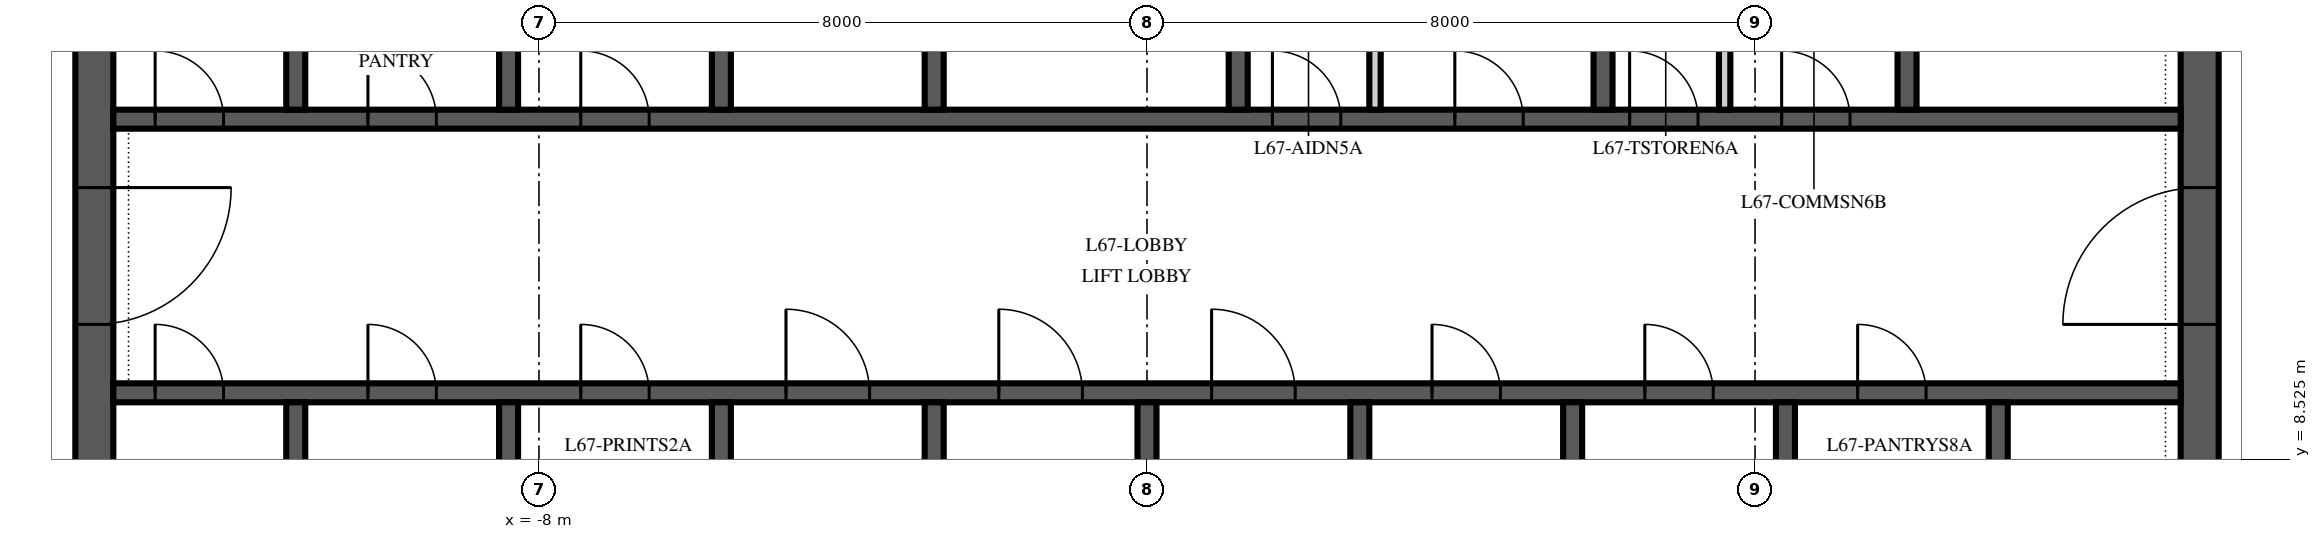
"""IFC4 building model, lengths in metres.
Left out: names, types, materials, properties, quantities, classifications, styles, units other than length and angle.
Written with IfcOpenShell. Run it as: python <this file> out.ifc"""

import sys

from ifc_helpers import new_model, si_unit, direction, frame, frame_2d, origin, place, context, subcontext, project, spatial, polyline, rectangle, outline, extrude, element, fill, save


model = new_model("IFC4")
c1 = context("Model", 3, precision=1e-05, world=origin(), true_north=direction((0.0, 1.0)))
c2 = subcontext(c1, "Body", "Model", "MODEL_VIEW")
j1 = project(units=[si_unit("LENGTHUNIT", "METRE"), si_unit("PLANEANGLEUNIT", "RADIAN")], contexts=[c1])
p1 = place(None, origin())
s1 = spatial("IfcSite", under=j1, at=p1, CompositionType="ELEMENT")
p2 = place(p1, origin())
s2 = spatial("IfcBuilding", under=s1, at=p2, CompositionType="ELEMENT")
p3 = place(p2, frame((0.0, 0.0, 288.0)))
s3 = spatial("IfcBuildingStorey", under=s2, at=p3, CompositionType="ELEMENT", Elevation=288.0)
p4 = place(p3, frame((13.85, 6.15, 0.0), z_axis=(0.0, 0.0, 1.0), x_axis=(0.0, 1.0, 0.0)))
e1 = element("IfcWall", 1, at=p4, inside=s3, PredefinedType="SHEAR", context=c2, shape_type="SweptSolid", body=[
    extrude(outline(polyline([(0.0, -0.25), (17.7, -0.25), (17.7, 0.0), (17.45, 0.0), (17.45, 0.25), (0.25, 0.25), (0.25, 0.0), (0.0, 0.0), (0.0, -0.25)])), origin(), (0.0, 0.0, 1.0), 4.0),
])
p5 = place(p4, frame((4.15, 0.0, 0.0)))
e2 = element("IfcOpeningElement", 2, at=p5, cuts=e1, PredefinedType="OPENING", context=c2, shape_type="SweptSolid", body=[
    extrude(rectangle(XDim=1.8, YDim=2.4, at=frame_2d((0.9, 1.2))), frame((0.0, 0.265, 0.0), z_axis=(0.0, -1.0, 0.0), x_axis=(1.0, 0.0, 0.0)), (0.0, 0.0, 1.0), 0.53),
])
p6 = place(p3, frame((-13.85, 23.85, 0.0), z_axis=(0.0, 0.0, 1.0), x_axis=(0.0, -1.0, 0.0)))
e3 = element("IfcWall", 3, at=p6, inside=s3, PredefinedType="SHEAR", context=c2, shape_type="SweptSolid", body=[
    extrude(outline(polyline([(0.0, -0.25), (17.7, -0.25), (17.7, 0.0), (17.45, 0.0), (17.45, 0.25), (0.25, 0.25), (0.25, 0.0), (0.0, 0.0), (0.0, -0.25)])), origin(), (0.0, 0.0, 1.0), 4.0),
])
p7 = place(p6, frame((11.75, 0.0, 0.0)))
e4 = element("IfcOpeningElement", 4, at=p7, cuts=e3, PredefinedType="OPENING", context=c2, shape_type="SweptSolid", body=[
    extrude(rectangle(XDim=1.8, YDim=2.4, at=frame_2d((0.9, 1.2))), frame((0.0, 0.265, 0.0), z_axis=(0.0, -1.0, 0.0), x_axis=(1.0, 0.0, 0.0)), (0.0, 0.0, 1.0), 0.53),
])
p8 = place(p3, frame((-13.6, 9.4, 0.0), z_axis=(0.0, 0.0, 1.0), x_axis=(1.0, 0.0, 0.0)))
e5 = element("IfcWall", 5, at=p8, inside=s3, PredefinedType="SHEAR", context=c2, shape_type="SweptSolid", body=[
    extrude(rectangle(XDim=27.2, YDim=0.25, at=frame_2d((13.6, 0.0))), origin(), (0.0, 0.0, 1.0), 4.0),
])
p9 = place(p8, frame((8.85, 0.0, 0.0)))
e6 = element("IfcOpeningElement", 6, at=p9, cuts=e5, PredefinedType="OPENING", context=c2, shape_type="SweptSolid", body=[
    extrude(rectangle(XDim=1.1, YDim=2.1, at=frame_2d((0.55, 1.05))), frame((0.0, 0.14, 0.0), z_axis=(0.0, -1.0, 0.0), x_axis=(1.0, 0.0, 0.0)), (0.0, 0.0, 1.0), 0.28),
])
p10 = place(p8, frame((11.65, 0.0, 0.0)))
e7 = element("IfcOpeningElement", 7, at=p10, cuts=e5, PredefinedType="OPENING", context=c2, shape_type="SweptSolid", body=[
    extrude(rectangle(XDim=1.1, YDim=2.1, at=frame_2d((0.55, 1.05))), frame((0.0, 0.14, 0.0), z_axis=(0.0, -1.0, 0.0), x_axis=(1.0, 0.0, 0.0)), (0.0, 0.0, 1.0), 0.28),
])
p11 = place(p8, frame((14.45, 0.0, 0.0)))
e8 = element("IfcOpeningElement", 8, at=p11, cuts=e5, PredefinedType="OPENING", context=c2, shape_type="SweptSolid", body=[
    extrude(rectangle(XDim=1.1, YDim=2.1, at=frame_2d((0.55, 1.05))), frame((0.0, 0.14, 0.0), z_axis=(0.0, -1.0, 0.0), x_axis=(1.0, 0.0, 0.0)), (0.0, 0.0, 1.0), 0.28),
])
p12 = place(p8, frame((0.55, 0.0, 0.0)))
e9 = element("IfcOpeningElement", 9, at=p12, cuts=e5, PredefinedType="OPENING", context=c2, shape_type="SweptSolid", body=[
    extrude(rectangle(XDim=0.9, YDim=2.1, at=frame_2d((0.45, 1.05))), frame((0.0, 0.14, 0.0), z_axis=(0.0, -1.0, 0.0), x_axis=(1.0, 0.0, 0.0)), (0.0, 0.0, 1.0), 0.28),
])
p13 = place(p8, frame((3.35, 0.0, 0.0)))
e10 = element("IfcOpeningElement", 10, at=p13, cuts=e5, PredefinedType="OPENING", context=c2, shape_type="SweptSolid", body=[
    extrude(rectangle(XDim=0.9, YDim=2.1, at=frame_2d((0.45, 1.05))), frame((0.0, 0.14, 0.0), z_axis=(0.0, -1.0, 0.0), x_axis=(1.0, 0.0, 0.0)), (0.0, 0.0, 1.0), 0.28),
])
p14 = place(p8, frame((6.15, 0.0, 0.0)))
e11 = element("IfcOpeningElement", 11, at=p14, cuts=e5, PredefinedType="OPENING", context=c2, shape_type="SweptSolid", body=[
    extrude(rectangle(XDim=0.9, YDim=2.1, at=frame_2d((0.45, 1.05))), frame((0.0, 0.14, 0.0), z_axis=(0.0, -1.0, 0.0), x_axis=(1.0, 0.0, 0.0)), (0.0, 0.0, 1.0), 0.28),
])
p15 = place(p8, frame((17.35, 0.0, 0.0)))
e12 = element("IfcOpeningElement", 12, at=p15, cuts=e5, PredefinedType="OPENING", context=c2, shape_type="SweptSolid", body=[
    extrude(rectangle(XDim=0.9, YDim=2.1, at=frame_2d((0.45, 1.05))), frame((0.0, 0.14, 0.0), z_axis=(0.0, -1.0, 0.0), x_axis=(1.0, 0.0, 0.0)), (0.0, 0.0, 1.0), 0.28),
])
p16 = place(p8, frame((20.15, 0.0, 0.0)))
e13 = element("IfcOpeningElement", 13, at=p16, cuts=e5, PredefinedType="OPENING", context=c2, shape_type="SweptSolid", body=[
    extrude(rectangle(XDim=0.9, YDim=2.1, at=frame_2d((0.45, 1.05))), frame((0.0, 0.14, 0.0), z_axis=(0.0, -1.0, 0.0), x_axis=(1.0, 0.0, 0.0)), (0.0, 0.0, 1.0), 0.28),
])
p17 = place(p8, frame((22.95, 0.0, 0.0)))
e14 = element("IfcOpeningElement", 14, at=p17, cuts=e5, PredefinedType="OPENING", context=c2, shape_type="SweptSolid", body=[
    extrude(rectangle(XDim=0.9, YDim=2.1, at=frame_2d((0.45, 1.05))), frame((0.0, 0.14, 0.0), z_axis=(0.0, -1.0, 0.0), x_axis=(1.0, 0.0, 0.0)), (0.0, 0.0, 1.0), 0.28),
])
p18 = place(p3, frame((-13.6, 13.0, 0.0), z_axis=(0.0, 0.0, 1.0), x_axis=(1.0, 0.0, 0.0)))
e15 = element("IfcWall", 15, at=p18, inside=s3, PredefinedType="SHEAR", context=c2, shape_type="SweptSolid", body=[
    extrude(rectangle(XDim=27.2, YDim=0.25, at=frame_2d((13.6, 0.0))), origin(), (0.0, 0.0, 1.0), 4.0),
])
p19 = place(p18, frame((15.25, 0.0, 0.0)))
e16 = element("IfcOpeningElement", 16, at=p19, cuts=e15, PredefinedType="OPENING", context=c2, shape_type="SweptSolid", body=[
    extrude(rectangle(XDim=0.9, YDim=2.1, at=frame_2d((0.45, 1.05))), frame((0.0, 0.14, 0.0), z_axis=(0.0, -1.0, 0.0), x_axis=(1.0, 0.0, 0.0)), (0.0, 0.0, 1.0), 0.28),
])
p20 = place(p18, frame((17.65, 0.0, 0.0)))
e17 = element("IfcOpeningElement", 17, at=p20, cuts=e15, PredefinedType="OPENING", context=c2, shape_type="SweptSolid", body=[
    extrude(rectangle(XDim=0.9, YDim=2.1, at=frame_2d((0.45, 1.05))), frame((0.0, 0.14, 0.0), z_axis=(0.0, -1.0, 0.0), x_axis=(1.0, 0.0, 0.0)), (0.0, 0.0, 1.0), 0.28),
])
p21 = place(p18, frame((19.95, 0.0, 0.0)))
e18 = element("IfcOpeningElement", 18, at=p21, cuts=e15, PredefinedType="OPENING", context=c2, shape_type="SweptSolid", body=[
    extrude(rectangle(XDim=0.9, YDim=2.1, at=frame_2d((0.45, 1.05))), frame((0.0, 0.14, 0.0), z_axis=(0.0, -1.0, 0.0), x_axis=(1.0, 0.0, 0.0)), (0.0, 0.0, 1.0), 0.28),
])
p22 = place(p18, frame((21.95, 0.0, 0.0)))
e19 = element("IfcOpeningElement", 19, at=p22, cuts=e15, PredefinedType="OPENING", context=c2, shape_type="SweptSolid", body=[
    extrude(rectangle(XDim=0.9, YDim=2.1, at=frame_2d((0.45, 1.05))), frame((0.0, 0.14, 0.0), z_axis=(0.0, -1.0, 0.0), x_axis=(1.0, 0.0, 0.0)), (0.0, 0.0, 1.0), 0.28),
])
p23 = place(p18, frame((0.55, 0.0, 0.0)))
e20 = element("IfcOpeningElement", 20, at=p23, cuts=e15, PredefinedType="OPENING", context=c2, shape_type="SweptSolid", body=[
    extrude(rectangle(XDim=0.9, YDim=2.1, at=frame_2d((0.45, 1.05))), frame((0.0, 0.14, 0.0), z_axis=(0.0, -1.0, 0.0), x_axis=(1.0, 0.0, 0.0)), (0.0, 0.0, 1.0), 0.28),
])
p24 = place(p18, frame((3.35, 0.0, 0.0)))
e21 = element("IfcOpeningElement", 21, at=p24, cuts=e15, PredefinedType="OPENING", context=c2, shape_type="SweptSolid", body=[
    extrude(rectangle(XDim=0.9, YDim=2.1, at=frame_2d((0.45, 1.05))), frame((0.0, 0.14, 0.0), z_axis=(0.0, -1.0, 0.0), x_axis=(1.0, 0.0, 0.0)), (0.0, 0.0, 1.0), 0.28),
])
p25 = place(p18, frame((6.15, 0.0, 0.0)))
e22 = element("IfcOpeningElement", 22, at=p25, cuts=e15, PredefinedType="OPENING", context=c2, shape_type="SweptSolid", body=[
    extrude(rectangle(XDim=0.9, YDim=2.1, at=frame_2d((0.45, 1.05))), frame((0.0, 0.14, 0.0), z_axis=(0.0, -1.0, 0.0), x_axis=(1.0, 0.0, 0.0)), (0.0, 0.0, 1.0), 0.28),
])
for number, where, z_axis, x_axis in (
    (23, (-11.2, 6.4, 0.0), (0.0, 0.0, 1.0), (0.0, 1.0, 0.0)),
    (24, (-8.4, 6.4, 0.0), (0.0, 0.0, 1.0), (0.0, 1.0, 0.0)),
    (25, (-5.6, 6.4, 0.0), (0.0, 0.0, 1.0), (0.0, 1.0, 0.0)),
    (26, (-2.8, 6.4, 0.0), (0.0, 0.0, 1.0), (0.0, 1.0, 0.0)),
    (27, (0.0, 6.4, 0.0), (0.0, 0.0, 1.0), (0.0, 1.0, 0.0)),
    (28, (2.8, 6.4, 0.0), (0.0, 0.0, 1.0), (0.0, 1.0, 0.0)),
    (29, (5.6, 6.4, 0.0), (0.0, 0.0, 1.0), (0.0, 1.0, 0.0)),
    (30, (8.4, 6.4, 0.0), (0.0, 0.0, 1.0), (0.0, 1.0, 0.0)),
    (31, (11.2, 6.4, 0.0), (0.0, 0.0, 1.0), (0.0, 1.0, 0.0)),
):
    element("IfcWall", number, at=place(p3, frame(where, z_axis=z_axis, x_axis=x_axis)), inside=s3, PredefinedType="SHEAR", context=c2, shape_type="SweptSolid", body=[
        extrude(rectangle(XDim=2.875, YDim=0.25, at=frame_2d((1.438, 0.0))), origin(), (0.0, 0.0, 1.0), 4.0),
    ])
for number, where, z_axis, x_axis in (
    (32, (-11.2, 13.125, 0.0), (0.0, 0.0, 1.0), (0.0, 1.0, 0.0)),
    (33, (-8.4, 13.125, 0.0), (0.0, 0.0, 1.0), (0.0, 1.0, 0.0)),
    (34, (-5.6, 13.125, 0.0), (0.0, 0.0, 1.0), (0.0, 1.0, 0.0)),
    (35, (-2.8, 13.125, 0.0), (0.0, 0.0, 1.0), (0.0, 1.0, 0.0)),
    (36, (1.2, 13.125, 0.0), (0.0, 0.0, 1.0), (0.0, 1.0, 0.0)),
    (37, (6.0, 13.125, 0.0), (0.0, 0.0, 1.0), (0.0, 1.0, 0.0)),
    (38, (10.0, 13.125, 0.0), (0.0, 0.0, 1.0), (0.0, 1.0, 0.0)),
):
    element("IfcWall", number, at=place(p3, frame(where, z_axis=z_axis, x_axis=x_axis)), inside=s3, PredefinedType="SHEAR", context=c2, shape_type="SweptSolid", body=[
        extrude(rectangle(XDim=2.75, YDim=0.25, at=frame_2d((1.375, 0.0))), origin(), (0.0, 0.0, 1.0), 4.0),
    ])
for number, where, z_axis, x_axis in (
    (39, (3.0, 13.125, 0.0), (0.0, 0.0, 1.0), (0.0, 1.0, 0.0)),
    (40, (7.6, 13.125, 0.0), (0.0, 0.0, 1.0), (0.0, 1.0, 0.0)),
):
    element("IfcWall", number, at=place(p3, frame(where, z_axis=z_axis, x_axis=x_axis)), inside=s3, PredefinedType="PARTITIONING", context=c2, shape_type="SweptSolid", body=[
        extrude(rectangle(XDim=2.75, YDim=0.15, at=frame_2d((1.375, 0.0))), origin(), (0.0, 0.0, 1.0), 3.85),
    ])
p26 = place(p5, origin())
e41 = element("IfcDoor", 41, at=p26, inside=s3, OperationType="DOUBLE_DOOR_SINGLE_SWING", PredefinedType="DOOR", context=c2, shape_type="SweptSolid", body=[
    extrude(rectangle(XDim=1.8, YDim=2.4, at=frame_2d((0.9, 1.2))), frame((0.0, 0.25, 0.0), z_axis=(0.0, -1.0, 0.0), x_axis=(1.0, 0.0, 0.0)), (0.0, 0.0, 1.0), 0.5),
])
fill(e2, e41)
p27 = place(p7, origin())
e42 = element("IfcDoor", 42, at=p27, inside=s3, OperationType="DOUBLE_DOOR_SINGLE_SWING", PredefinedType="DOOR", context=c2, shape_type="SweptSolid", body=[
    extrude(rectangle(XDim=1.8, YDim=2.4, at=frame_2d((0.9, 1.2))), frame((0.0, 0.25, 0.0), z_axis=(0.0, -1.0, 0.0), x_axis=(1.0, 0.0, 0.0)), (0.0, 0.0, 1.0), 0.5),
])
fill(e4, e42)
p28 = place(p9, origin())
e43 = element("IfcDoor", 43, at=p28, inside=s3, OperationType="SLIDING_TO_LEFT", PredefinedType="DOOR", context=c2, shape_type="SweptSolid", body=[
    extrude(rectangle(XDim=1.1, YDim=2.1, at=frame_2d((0.55, 1.05))), frame((0.0, 0.125, 0.0), z_axis=(0.0, -1.0, 0.0), x_axis=(1.0, 0.0, 0.0)), (0.0, 0.0, 1.0), 0.25),
])
fill(e6, e43)
p29 = place(p10, origin())
e44 = element("IfcDoor", 44, at=p29, inside=s3, OperationType="SLIDING_TO_LEFT", PredefinedType="DOOR", context=c2, shape_type="SweptSolid", body=[
    extrude(rectangle(XDim=1.1, YDim=2.1, at=frame_2d((0.55, 1.05))), frame((0.0, 0.125, 0.0), z_axis=(0.0, -1.0, 0.0), x_axis=(1.0, 0.0, 0.0)), (0.0, 0.0, 1.0), 0.25),
])
fill(e7, e44)
p30 = place(p11, origin())
e45 = element("IfcDoor", 45, at=p30, inside=s3, OperationType="SLIDING_TO_LEFT", PredefinedType="DOOR", context=c2, shape_type="SweptSolid", body=[
    extrude(rectangle(XDim=1.1, YDim=2.1, at=frame_2d((0.55, 1.05))), frame((0.0, 0.125, 0.0), z_axis=(0.0, -1.0, 0.0), x_axis=(1.0, 0.0, 0.0)), (0.0, 0.0, 1.0), 0.25),
])
fill(e8, e45)
p31 = place(p19, origin())
e46 = element("IfcDoor", 46, at=p31, inside=s3, OperationType="SINGLE_SWING_LEFT", PredefinedType="DOOR", context=c2, shape_type="SweptSolid", body=[
    extrude(rectangle(XDim=0.9, YDim=2.1, at=frame_2d((0.45, 1.05))), frame((0.0, 0.125, 0.0), z_axis=(0.0, -1.0, 0.0), x_axis=(1.0, 0.0, 0.0)), (0.0, 0.0, 1.0), 0.25),
])
fill(e16, e46)
p32 = place(p20, origin())
e47 = element("IfcDoor", 47, at=p32, inside=s3, OperationType="SINGLE_SWING_LEFT", PredefinedType="DOOR", context=c2, shape_type="SweptSolid", body=[
    extrude(rectangle(XDim=0.9, YDim=2.1, at=frame_2d((0.45, 1.05))), frame((0.0, 0.125, 0.0), z_axis=(0.0, -1.0, 0.0), x_axis=(1.0, 0.0, 0.0)), (0.0, 0.0, 1.0), 0.25),
])
fill(e17, e47)
p33 = place(p21, origin())
e48 = element("IfcDoor", 48, at=p33, inside=s3, OperationType="SINGLE_SWING_LEFT", PredefinedType="DOOR", context=c2, shape_type="SweptSolid", body=[
    extrude(rectangle(XDim=0.9, YDim=2.1, at=frame_2d((0.45, 1.05))), frame((0.0, 0.125, 0.0), z_axis=(0.0, -1.0, 0.0), x_axis=(1.0, 0.0, 0.0)), (0.0, 0.0, 1.0), 0.25),
])
fill(e18, e48)
p34 = place(p22, origin())
e49 = element("IfcDoor", 49, at=p34, inside=s3, OperationType="SINGLE_SWING_LEFT", PredefinedType="DOOR", context=c2, shape_type="SweptSolid", body=[
    extrude(rectangle(XDim=0.9, YDim=2.1, at=frame_2d((0.45, 1.05))), frame((0.0, 0.125, 0.0), z_axis=(0.0, -1.0, 0.0), x_axis=(1.0, 0.0, 0.0)), (0.0, 0.0, 1.0), 0.25),
])
fill(e19, e49)
p35 = place(p23, origin())
e50 = element("IfcDoor", 50, at=p35, inside=s3, OperationType="SINGLE_SWING_LEFT", PredefinedType="DOOR", context=c2, shape_type="SweptSolid", body=[
    extrude(rectangle(XDim=0.9, YDim=2.1, at=frame_2d((0.45, 1.05))), frame((0.0, 0.125, 0.0), z_axis=(0.0, -1.0, 0.0), x_axis=(1.0, 0.0, 0.0)), (0.0, 0.0, 1.0), 0.25),
])
fill(e20, e50)
p36 = place(p24, origin())
e51 = element("IfcDoor", 51, at=p36, inside=s3, OperationType="SINGLE_SWING_LEFT", PredefinedType="DOOR", context=c2, shape_type="SweptSolid", body=[
    extrude(rectangle(XDim=0.9, YDim=2.1, at=frame_2d((0.45, 1.05))), frame((0.0, 0.125, 0.0), z_axis=(0.0, -1.0, 0.0), x_axis=(1.0, 0.0, 0.0)), (0.0, 0.0, 1.0), 0.25),
])
fill(e21, e51)
p37 = place(p25, origin())
e52 = element("IfcDoor", 52, at=p37, inside=s3, OperationType="SINGLE_SWING_LEFT", PredefinedType="DOOR", context=c2, shape_type="SweptSolid", body=[
    extrude(rectangle(XDim=0.9, YDim=2.1, at=frame_2d((0.45, 1.05))), frame((0.0, 0.125, 0.0), z_axis=(0.0, -1.0, 0.0), x_axis=(1.0, 0.0, 0.0)), (0.0, 0.0, 1.0), 0.25),
])
fill(e22, e52)
p38 = place(p12, origin())
e53 = element("IfcDoor", 53, at=p38, inside=s3, OperationType="SINGLE_SWING_LEFT", PredefinedType="DOOR", context=c2, shape_type="SweptSolid", body=[
    extrude(rectangle(XDim=0.9, YDim=2.1, at=frame_2d((0.45, 1.05))), frame((0.0, 0.125, 0.0), z_axis=(0.0, -1.0, 0.0), x_axis=(1.0, 0.0, 0.0)), (0.0, 0.0, 1.0), 0.25),
])
fill(e9, e53)
p39 = place(p13, origin())
e54 = element("IfcDoor", 54, at=p39, inside=s3, OperationType="SINGLE_SWING_LEFT", PredefinedType="DOOR", context=c2, shape_type="SweptSolid", body=[
    extrude(rectangle(XDim=0.9, YDim=2.1, at=frame_2d((0.45, 1.05))), frame((0.0, 0.125, 0.0), z_axis=(0.0, -1.0, 0.0), x_axis=(1.0, 0.0, 0.0)), (0.0, 0.0, 1.0), 0.25),
])
fill(e10, e54)
p40 = place(p14, origin())
e55 = element("IfcDoor", 55, at=p40, inside=s3, OperationType="SINGLE_SWING_LEFT", PredefinedType="DOOR", context=c2, shape_type="SweptSolid", body=[
    extrude(rectangle(XDim=0.9, YDim=2.1, at=frame_2d((0.45, 1.05))), frame((0.0, 0.125, 0.0), z_axis=(0.0, -1.0, 0.0), x_axis=(1.0, 0.0, 0.0)), (0.0, 0.0, 1.0), 0.25),
])
fill(e11, e55)
p41 = place(p15, origin())
e56 = element("IfcDoor", 56, at=p41, inside=s3, OperationType="SINGLE_SWING_LEFT", PredefinedType="DOOR", context=c2, shape_type="SweptSolid", body=[
    extrude(rectangle(XDim=0.9, YDim=2.1, at=frame_2d((0.45, 1.05))), frame((0.0, 0.125, 0.0), z_axis=(0.0, -1.0, 0.0), x_axis=(1.0, 0.0, 0.0)), (0.0, 0.0, 1.0), 0.25),
])
fill(e12, e56)
p42 = place(p16, origin())
e57 = element("IfcDoor", 57, at=p42, inside=s3, OperationType="SINGLE_SWING_LEFT", PredefinedType="DOOR", context=c2, shape_type="SweptSolid", body=[
    extrude(rectangle(XDim=0.9, YDim=2.1, at=frame_2d((0.45, 1.05))), frame((0.0, 0.125, 0.0), z_axis=(0.0, -1.0, 0.0), x_axis=(1.0, 0.0, 0.0)), (0.0, 0.0, 1.0), 0.25),
])
fill(e13, e57)
p43 = place(p17, origin())
e58 = element("IfcDoor", 58, at=p43, inside=s3, OperationType="SINGLE_SWING_LEFT", PredefinedType="DOOR", context=c2, shape_type="SweptSolid", body=[
    extrude(rectangle(XDim=0.9, YDim=2.1, at=frame_2d((0.45, 1.05))), frame((0.0, 0.125, 0.0), z_axis=(0.0, -1.0, 0.0), x_axis=(1.0, 0.0, 0.0)), (0.0, 0.0, 1.0), 0.25),
])
fill(e14, e58)
save(model, sys.argv[1])
